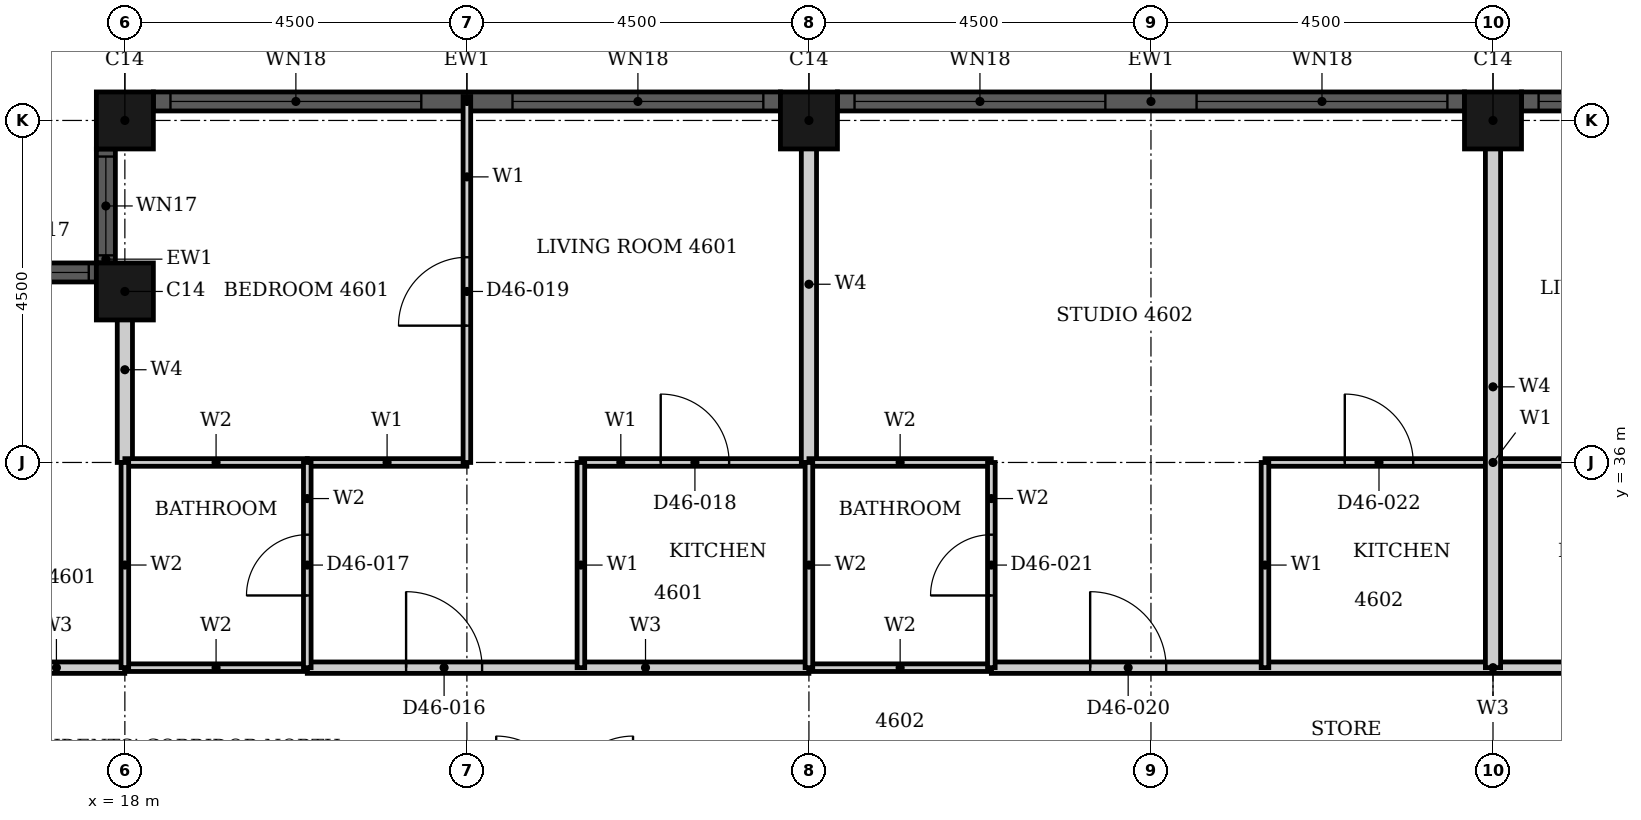
"""IFC4 building model, lengths in metres.
Left out: names, types, materials, properties, quantities, classifications, styles, units other than length and angle.
Written with IfcOpenShell. Run it as: python <this file> out.ifc"""

import sys

from ifc_helpers import new_model, si_unit, direction, frame, frame_2d, origin, origin_2d, place, context, subcontext, project, spatial, rectangle, hollow_rectangle, extrude, element, fill, save


model = new_model("IFC4")
c1 = context("Model", 3, precision=1e-05, world=origin(), true_north=direction((0.0, 1.0)))
c2 = subcontext(c1, "Body", "Model", "MODEL_VIEW")
j1 = project(units=[si_unit("LENGTHUNIT", "METRE"), si_unit("PLANEANGLEUNIT", "RADIAN")], contexts=[c1])
p1 = place(None, origin())
s1 = spatial("IfcSite", under=j1, at=p1, CompositionType="ELEMENT")
p2 = place(p1, origin())
s2 = spatial("IfcBuilding", under=s1, at=p2, CompositionType="ELEMENT")
p3 = place(p2, frame((0.0, 0.0, 183.9)))
s3 = spatial("IfcBuildingStorey", under=s2, at=p3, CompositionType="ELEMENT", Elevation=183.9)
for number, where, z_axis, x_axis in (
    (1, (36.0, 40.5, 0.0), (0.0, 0.0, 1.0), (1.0, 0.0, 0.0)),
    (2, (27.0, 40.5, 0.0), (0.0, 0.0, 1.0), (1.0, 0.0, 0.0)),
    (3, (18.0, 40.5, 0.0), (0.0, 0.0, 1.0), (1.0, 0.0, 0.0)),
    (4, (18.0, 38.25, 0.0), (0.0, 0.0, 1.0), (1.0, 0.0, 0.0)),
):
    element("IfcColumn", number, at=place(p3, frame(where, z_axis=z_axis, x_axis=x_axis)), inside=s3, PredefinedType="COLUMN", context=c2, shape_type="SweptSolid", body=[
        extrude(hollow_rectangle(XDim=0.75, YDim=0.75, WallThickness=0.024, at=origin_2d()), origin(), (0.0, 0.0, 1.0), 3.7),
    ])
p4 = place(p3, frame((44.625, 40.75, 0.0), z_axis=(0.0, 0.0, 1.0), x_axis=(-1.0, 0.0, 0.0)))
e5 = element("IfcWall", 5, at=p4, inside=s3, PredefinedType="SOLIDWALL", context=c2, shape_type="SweptSolid", body=[
    extrude(rectangle(XDim=8.25, YDim=0.25, at=frame_2d((4.125, 0.0))), origin(), (0.0, 0.0, 1.0), 3.7),
])
p5 = place(p4, frame((0.225, 0.0, 0.45)))
e6 = element("IfcOpeningElement", 6, at=p5, cuts=e5, PredefinedType="OPENING", context=c2, shape_type="SweptSolid", body=[
    extrude(rectangle(XDim=3.3, YDim=2.4, at=frame_2d((1.65, 1.2))), frame((0.0, 0.135, 0.0), z_axis=(0.0, -1.0, 0.0), x_axis=(1.0, 0.0, 0.0)), (0.0, 0.0, 1.0), 0.27),
])
p6 = place(p4, frame((4.725, 0.0, 0.45)))
e7 = element("IfcOpeningElement", 7, at=p6, cuts=e5, PredefinedType="OPENING", context=c2, shape_type="SweptSolid", body=[
    extrude(rectangle(XDim=3.3, YDim=2.4, at=frame_2d((1.65, 1.2))), frame((0.0, 0.135, 0.0), z_axis=(0.0, -1.0, 0.0), x_axis=(1.0, 0.0, 0.0)), (0.0, 0.0, 1.0), 0.27),
])
p7 = place(p3, frame((35.625, 40.75, 0.0), z_axis=(0.0, 0.0, 1.0), x_axis=(-1.0, 0.0, 0.0)))
e8 = element("IfcWall", 8, at=p7, inside=s3, PredefinedType="SOLIDWALL", context=c2, shape_type="SweptSolid", body=[
    extrude(rectangle(XDim=8.25, YDim=0.25, at=frame_2d((4.125, 0.0))), origin(), (0.0, 0.0, 1.0), 3.7),
])
p8 = place(p7, frame((0.225, 0.0, 0.45)))
e9 = element("IfcOpeningElement", 9, at=p8, cuts=e8, PredefinedType="OPENING", context=c2, shape_type="SweptSolid", body=[
    extrude(rectangle(XDim=3.3, YDim=2.4, at=frame_2d((1.65, 1.2))), frame((0.0, 0.135, 0.0), z_axis=(0.0, -1.0, 0.0), x_axis=(1.0, 0.0, 0.0)), (0.0, 0.0, 1.0), 0.27),
])
p9 = place(p7, frame((4.725, 0.0, 0.45)))
e10 = element("IfcOpeningElement", 10, at=p9, cuts=e8, PredefinedType="OPENING", context=c2, shape_type="SweptSolid", body=[
    extrude(rectangle(XDim=3.3, YDim=2.4, at=frame_2d((1.65, 1.2))), frame((0.0, 0.135, 0.0), z_axis=(0.0, -1.0, 0.0), x_axis=(1.0, 0.0, 0.0)), (0.0, 0.0, 1.0), 0.27),
])
p10 = place(p3, frame((26.625, 40.75, 0.0), z_axis=(0.0, 0.0, 1.0), x_axis=(-1.0, 0.0, 0.0)))
e11 = element("IfcWall", 11, at=p10, inside=s3, PredefinedType="SOLIDWALL", context=c2, shape_type="SweptSolid", body=[
    extrude(rectangle(XDim=8.25, YDim=0.25, at=frame_2d((4.125, 0.0))), origin(), (0.0, 0.0, 1.0), 3.7),
])
p11 = place(p10, frame((0.225, 0.0, 0.45)))
e12 = element("IfcOpeningElement", 12, at=p11, cuts=e11, PredefinedType="OPENING", context=c2, shape_type="SweptSolid", body=[
    extrude(rectangle(XDim=3.3, YDim=2.4, at=frame_2d((1.65, 1.2))), frame((0.0, 0.135, 0.0), z_axis=(0.0, -1.0, 0.0), x_axis=(1.0, 0.0, 0.0)), (0.0, 0.0, 1.0), 0.27),
])
p12 = place(p10, frame((4.725, 0.0, 0.45)))
e13 = element("IfcOpeningElement", 13, at=p12, cuts=e11, PredefinedType="OPENING", context=c2, shape_type="SweptSolid", body=[
    extrude(rectangle(XDim=3.3, YDim=2.4, at=frame_2d((1.65, 1.2))), frame((0.0, 0.135, 0.0), z_axis=(0.0, -1.0, 0.0), x_axis=(1.0, 0.0, 0.0)), (0.0, 0.0, 1.0), 0.27),
])
p13 = place(p3, frame((17.75, 40.125, 0.0), z_axis=(0.0, 0.0, 1.0), x_axis=(0.0, -1.0, 0.0)))
e14 = element("IfcWall", 14, at=p13, inside=s3, PredefinedType="SOLIDWALL", context=c2, shape_type="SweptSolid", body=[
    extrude(rectangle(XDim=1.5, YDim=0.25, at=frame_2d((0.75, 0.0))), origin(), (0.0, 0.0, 1.0), 3.7),
])
p14 = place(p13, frame((0.1, 0.0, 0.9)))
e15 = element("IfcOpeningElement", 15, at=p14, cuts=e14, PredefinedType="OPENING", context=c2, shape_type="SweptSolid", body=[
    extrude(rectangle(XDim=1.3, YDim=1.95, at=frame_2d((0.65, 0.975))), frame((0.0, 0.135, 0.0), z_axis=(0.0, -1.0, 0.0), x_axis=(1.0, 0.0, 0.0)), (0.0, 0.0, 1.0), 0.27),
])
p15 = place(p3, frame((17.625, 38.5, 0.0), z_axis=(0.0, 0.0, 1.0), x_axis=(-1.0, 0.0, 0.0)))
e16 = element("IfcWall", 16, at=p15, inside=s3, PredefinedType="SOLIDWALL", context=c2, shape_type="SweptSolid", body=[
    extrude(rectangle(XDim=1.5, YDim=0.25, at=frame_2d((0.75, 0.0))), origin(), (0.0, 0.0, 1.0), 3.7),
])
p16 = place(p15, frame((0.1, 0.0, 0.9)))
e17 = element("IfcOpeningElement", 17, at=p16, cuts=e16, PredefinedType="OPENING", context=c2, shape_type="SweptSolid", body=[
    extrude(rectangle(XDim=1.3, YDim=1.95, at=frame_2d((0.65, 0.975))), frame((0.0, 0.135, 0.0), z_axis=(0.0, -1.0, 0.0), x_axis=(1.0, 0.0, 0.0)), (0.0, 0.0, 1.0), 0.27),
])
p17 = place(p3, frame((20.4, 33.3, 0.0), z_axis=(0.0, 0.0, 1.0), x_axis=(1.0, 0.0, 0.0)))
e18 = element("IfcWall", 18, at=p17, inside=s3, PredefinedType="PARTITIONING", context=c2, shape_type="SweptSolid", body=[
    extrude(rectangle(XDim=6.6, YDim=0.15, at=frame_2d((3.3, 0.0))), origin(), (0.0, 0.0, 1.0), 3.3),
])
p18 = place(p17, frame((1.3, 0.0, 0.0)))
e19 = element("IfcOpeningElement", 19, at=p18, cuts=e18, PredefinedType="OPENING", context=c2, shape_type="SweptSolid", body=[
    extrude(rectangle(XDim=1.0, YDim=2.2, at=frame_2d((0.5, 1.1))), frame((0.0, 0.085, 0.0), z_axis=(0.0, -1.0, 0.0), x_axis=(1.0, 0.0, 0.0)), (0.0, 0.0, 1.0), 0.17),
])
p19 = place(p3, frame((29.4, 33.3, 0.0), z_axis=(0.0, 0.0, 1.0), x_axis=(1.0, 0.0, 0.0)))
e20 = element("IfcWall", 20, at=p19, inside=s3, PredefinedType="PARTITIONING", context=c2, shape_type="SweptSolid", body=[
    extrude(rectangle(XDim=13.2, YDim=0.15, at=frame_2d((6.6, 0.0))), origin(), (0.0, 0.0, 1.0), 3.3),
])
p20 = place(p19, frame((1.3, 0.0, 0.0)))
e21 = element("IfcOpeningElement", 21, at=p20, cuts=e20, PredefinedType="OPENING", context=c2, shape_type="SweptSolid", body=[
    extrude(rectangle(XDim=1.0, YDim=2.2, at=frame_2d((0.5, 1.1))), frame((0.0, 0.085, 0.0), z_axis=(0.0, -1.0, 0.0), x_axis=(1.0, 0.0, 0.0)), (0.0, 0.0, 1.0), 0.17),
])
p21 = place(p19, frame((10.9, 0.0, 0.0)))
e22 = element("IfcOpeningElement", 22, at=p21, cuts=e20, PredefinedType="OPENING", context=c2, shape_type="SweptSolid", body=[
    extrude(rectangle(XDim=1.0, YDim=2.2, at=frame_2d((0.5, 1.1))), frame((0.0, 0.085, 0.0), z_axis=(0.0, -1.0, 0.0), x_axis=(1.0, 0.0, 0.0)), (0.0, 0.0, 1.0), 0.17),
])
p22 = place(p3, frame((16.2, 33.3, 0.0), z_axis=(0.0, 0.0, 1.0), x_axis=(1.0, 0.0, 0.0)))
e23 = element("IfcWall", 23, at=p22, inside=s3, PredefinedType="PARTITIONING", context=c2, shape_type="SweptSolid", body=[
    extrude(rectangle(XDim=1.799, YDim=0.15, at=frame_2d((0.899, 0.0))), origin(), (0.0, 0.0, 1.0), 3.3),
])
p23 = place(p3, frame((20.4, 36.0, 0.0), z_axis=(0.0, 0.0, 1.0), x_axis=(1.0, 0.0, 0.0)))
e24 = element("IfcWall", 24, at=p23, inside=s3, PredefinedType="PARTITIONING", context=c2, shape_type="SweptSolid", body=[
    extrude(rectangle(XDim=2.1, YDim=0.1, at=frame_2d((1.05, 0.0))), origin(), (0.0, 0.0, 1.0), 3.3),
])
p24 = place(p3, frame((24.0, 36.0, 0.0), z_axis=(0.0, 0.0, 1.0), x_axis=(1.0, 0.0, 0.0)))
e25 = element("IfcWall", 25, at=p24, inside=s3, PredefinedType="PARTITIONING", context=c2, shape_type="SweptSolid", body=[
    extrude(rectangle(XDim=3.0, YDim=0.1, at=frame_2d((1.5, 0.0))), origin(), (0.0, 0.0, 1.0), 3.3),
])
p25 = place(p24, frame((1.05, 0.0, 0.0)))
e26 = element("IfcOpeningElement", 26, at=p25, cuts=e25, PredefinedType="OPENING", context=c2, shape_type="SweptSolid", body=[
    extrude(rectangle(XDim=0.9, YDim=2.1, at=frame_2d((0.45, 1.05))), frame((0.0, 0.06, 0.0), z_axis=(0.0, -1.0, 0.0), x_axis=(1.0, 0.0, 0.0)), (0.0, 0.0, 1.0), 0.12),
])
p26 = place(p3, frame((33.0, 36.0, 0.0), z_axis=(0.0, 0.0, 1.0), x_axis=(1.0, 0.0, 0.0)))
e27 = element("IfcWall", 27, at=p26, inside=s3, PredefinedType="PARTITIONING", context=c2, shape_type="SweptSolid", body=[
    extrude(rectangle(XDim=6.0, YDim=0.1, at=frame_2d((3.0, 0.0))), origin(), (0.0, 0.0, 1.0), 3.3),
])
p27 = place(p26, frame((1.05, 0.0, 0.0)))
e28 = element("IfcOpeningElement", 28, at=p27, cuts=e27, PredefinedType="OPENING", context=c2, shape_type="SweptSolid", body=[
    extrude(rectangle(XDim=0.9, YDim=2.1, at=frame_2d((0.45, 1.05))), frame((0.0, 0.06, 0.0), z_axis=(0.0, -1.0, 0.0), x_axis=(1.0, 0.0, 0.0)), (0.0, 0.0, 1.0), 0.12),
])
p28 = place(p26, frame((4.05, 0.0, 0.0)))
e29 = element("IfcOpeningElement", 29, at=p28, cuts=e27, PredefinedType="OPENING", context=c2, shape_type="SweptSolid", body=[
    extrude(rectangle(XDim=0.9, YDim=2.1, at=frame_2d((0.45, 1.05))), frame((0.0, 0.06, 0.0), z_axis=(0.0, -1.0, 0.0), x_axis=(1.0, 0.0, 0.0)), (0.0, 0.0, 1.0), 0.12),
])
p29 = place(p3, frame((22.5, 36.0, 0.0), z_axis=(0.0, 0.0, 1.0), x_axis=(0.0, 1.0, 0.0)))
e30 = element("IfcWall", 30, at=p29, inside=s3, PredefinedType="PARTITIONING", context=c2, shape_type="SweptSolid", body=[
    extrude(rectangle(XDim=4.815, YDim=0.1, at=frame_2d((2.407, 0.0))), origin(), (0.0, 0.0, 1.0), 3.3),
])
p30 = place(p29, frame((1.8, 0.0, 0.0)))
e31 = element("IfcOpeningElement", 31, at=p30, cuts=e30, PredefinedType="OPENING", context=c2, shape_type="SweptSolid", body=[
    extrude(rectangle(XDim=0.9, YDim=2.1, at=frame_2d((0.45, 1.05))), frame((0.0, 0.06, 0.0), z_axis=(0.0, -1.0, 0.0), x_axis=(1.0, 0.0, 0.0)), (0.0, 0.0, 1.0), 0.12),
])
for number, where, z_axis, x_axis in (
    (32, (24.0, 33.3, 0.0), (0.0, 0.0, 1.0), (0.0, 1.0, 0.0)),
    (33, (33.0, 33.3, 0.0), (0.0, 0.0, 1.0), (0.0, 1.0, 0.0)),
):
    element("IfcWall", number, at=place(p3, frame(where, z_axis=z_axis, x_axis=x_axis)), inside=s3, PredefinedType="PARTITIONING", context=c2, shape_type="SweptSolid", body=[
        extrude(rectangle(XDim=2.7, YDim=0.1, at=frame_2d((1.35, 0.0))), origin(), (0.0, 0.0, 1.0), 3.3),
    ])
p31 = place(p3, frame((18.0, 36.0, 0.0), z_axis=(0.0, 0.0, 1.0), x_axis=(0.0, 1.0, 0.0)))
e34 = element("IfcWall", 34, at=p31, inside=s3, PredefinedType="PARTITIONING", context=c2, shape_type="SweptSolid", body=[
    extrude(rectangle(XDim=2.44, YDim=0.2, at=frame_2d((1.22, 0.0))), origin(), (0.0, 0.0, 1.0), 3.3),
])
p32 = place(p3, frame((27.0, 36.0, 0.0), z_axis=(0.0, 0.0, 1.0), x_axis=(0.0, 1.0, 0.0)))
e35 = element("IfcWall", 35, at=p32, inside=s3, PredefinedType="PARTITIONING", context=c2, shape_type="SweptSolid", body=[
    extrude(rectangle(XDim=4.69, YDim=0.2, at=frame_2d((2.345, 0.0))), origin(), (0.0, 0.0, 1.0), 3.3),
])
p33 = place(p3, frame((36.0, 33.3, 0.0), z_axis=(0.0, 0.0, 1.0), x_axis=(0.0, 1.0, 0.0)))
e36 = element("IfcWall", 36, at=p33, inside=s3, PredefinedType="PARTITIONING", context=c2, shape_type="SweptSolid", body=[
    extrude(rectangle(XDim=7.39, YDim=0.2, at=frame_2d((3.695, 0.0))), origin(), (0.0, 0.0, 1.0), 3.3),
])
for number, where, z_axis, x_axis in (
    (37, (18.0, 33.3, 0.0), (0.0, 0.0, 1.0), (1.0, 0.0, 0.0)),
    (38, (27.0, 33.3, 0.0), (0.0, 0.0, 1.0), (1.0, 0.0, 0.0)),
    (39, (18.0, 36.0, 0.0), (0.0, 0.0, 1.0), (1.0, 0.0, 0.0)),
    (40, (27.0, 36.0, 0.0), (0.0, 0.0, 1.0), (1.0, 0.0, 0.0)),
):
    element("IfcWall", number, at=place(p3, frame(where, z_axis=z_axis, x_axis=x_axis)), inside=s3, PredefinedType="PARTITIONING", context=c2, shape_type="SweptSolid", body=[
        extrude(rectangle(XDim=2.4, YDim=0.1, at=frame_2d((1.2, 0.0))), origin(), (0.0, 0.0, 1.0), 3.3),
    ])
p34 = place(p3, frame((18.0, 33.301, 0.0), z_axis=(0.0, 0.0, 1.0), x_axis=(0.0, 1.0, 0.0)))
e41 = element("IfcWall", 41, at=p34, inside=s3, PredefinedType="PARTITIONING", context=c2, shape_type="SweptSolid", body=[
    extrude(rectangle(XDim=2.699, YDim=0.1, at=frame_2d((1.35, 0.0))), origin(), (0.0, 0.0, 1.0), 3.3),
])
p35 = place(p3, frame((20.4, 33.3, 0.0), z_axis=(0.0, 0.0, 1.0), x_axis=(0.0, 1.0, 0.0)))
e42 = element("IfcWall", 42, at=p35, inside=s3, PredefinedType="PARTITIONING", context=c2, shape_type="SweptSolid", body=[
    extrude(rectangle(XDim=2.7, YDim=0.1, at=frame_2d((1.35, 0.0))), origin(), (0.0, 0.0, 1.0), 3.3),
])
p36 = place(p35, frame((0.95, 0.0, 0.0)))
e43 = element("IfcOpeningElement", 43, at=p36, cuts=e42, PredefinedType="OPENING", context=c2, shape_type="SweptSolid", body=[
    extrude(rectangle(XDim=0.8, YDim=2.1, at=frame_2d((0.4, 1.05))), frame((0.0, 0.06, 0.0), z_axis=(0.0, -1.0, 0.0), x_axis=(1.0, 0.0, 0.0)), (0.0, 0.0, 1.0), 0.12),
])
p37 = place(p3, frame((27.0, 33.3, 0.0), z_axis=(0.0, 0.0, 1.0), x_axis=(0.0, 1.0, 0.0)))
e44 = element("IfcWall", 44, at=p37, inside=s3, PredefinedType="PARTITIONING", context=c2, shape_type="SweptSolid", body=[
    extrude(rectangle(XDim=2.7, YDim=0.1, at=frame_2d((1.35, 0.0))), origin(), (0.0, 0.0, 1.0), 3.3),
])
p38 = place(p3, frame((29.4, 33.3, 0.0), z_axis=(0.0, 0.0, 1.0), x_axis=(0.0, 1.0, 0.0)))
e45 = element("IfcWall", 45, at=p38, inside=s3, PredefinedType="PARTITIONING", context=c2, shape_type="SweptSolid", body=[
    extrude(rectangle(XDim=2.7, YDim=0.1, at=frame_2d((1.35, 0.0))), origin(), (0.0, 0.0, 1.0), 3.3),
])
p39 = place(p38, frame((0.95, 0.0, 0.0)))
e46 = element("IfcOpeningElement", 46, at=p39, cuts=e45, PredefinedType="OPENING", context=c2, shape_type="SweptSolid", body=[
    extrude(rectangle(XDim=0.8, YDim=2.1, at=frame_2d((0.4, 1.05))), frame((0.0, 0.06, 0.0), z_axis=(0.0, -1.0, 0.0), x_axis=(1.0, 0.0, 0.0)), (0.0, 0.0, 1.0), 0.12),
])
p40 = place(p6, origin())
e47 = element("IfcWindow", 47, at=p40, inside=s3, PartitioningType="SINGLE_PANEL", PredefinedType="WINDOW", context=c2, shape_type="SweptSolid", body=[
    extrude(rectangle(XDim=3.3, YDim=2.4, at=frame_2d((1.65, 1.2))), frame((0.0, 0.03, 0.0), z_axis=(0.0, -1.0, 0.0), x_axis=(1.0, 0.0, 0.0)), (0.0, 0.0, 1.0), 0.06),
])
fill(e7, e47)
p41 = place(p8, origin())
e48 = element("IfcWindow", 48, at=p41, inside=s3, PartitioningType="SINGLE_PANEL", PredefinedType="WINDOW", context=c2, shape_type="SweptSolid", body=[
    extrude(rectangle(XDim=3.3, YDim=2.4, at=frame_2d((1.65, 1.2))), frame((0.0, 0.03, 0.0), z_axis=(0.0, -1.0, 0.0), x_axis=(1.0, 0.0, 0.0)), (0.0, 0.0, 1.0), 0.06),
])
fill(e9, e48)
p42 = place(p9, origin())
e49 = element("IfcWindow", 49, at=p42, inside=s3, PartitioningType="SINGLE_PANEL", PredefinedType="WINDOW", context=c2, shape_type="SweptSolid", body=[
    extrude(rectangle(XDim=3.3, YDim=2.4, at=frame_2d((1.65, 1.2))), frame((0.0, 0.03, 0.0), z_axis=(0.0, -1.0, 0.0), x_axis=(1.0, 0.0, 0.0)), (0.0, 0.0, 1.0), 0.06),
])
fill(e10, e49)
p43 = place(p11, origin())
e50 = element("IfcWindow", 50, at=p43, inside=s3, PartitioningType="SINGLE_PANEL", PredefinedType="WINDOW", context=c2, shape_type="SweptSolid", body=[
    extrude(rectangle(XDim=3.3, YDim=2.4, at=frame_2d((1.65, 1.2))), frame((0.0, 0.03, 0.0), z_axis=(0.0, -1.0, 0.0), x_axis=(1.0, 0.0, 0.0)), (0.0, 0.0, 1.0), 0.06),
])
fill(e12, e50)
p44 = place(p12, origin())
e51 = element("IfcWindow", 51, at=p44, inside=s3, PartitioningType="SINGLE_PANEL", PredefinedType="WINDOW", context=c2, shape_type="SweptSolid", body=[
    extrude(rectangle(XDim=3.3, YDim=2.4, at=frame_2d((1.65, 1.2))), frame((0.0, 0.03, 0.0), z_axis=(0.0, -1.0, 0.0), x_axis=(1.0, 0.0, 0.0)), (0.0, 0.0, 1.0), 0.06),
])
fill(e13, e51)
p45 = place(p14, origin())
e52 = element("IfcWindow", 52, at=p45, inside=s3, PartitioningType="SINGLE_PANEL", PredefinedType="WINDOW", context=c2, shape_type="SweptSolid", body=[
    extrude(rectangle(XDim=1.3, YDim=1.95, at=frame_2d((0.65, 0.975))), frame((0.0, 0.03, 0.0), z_axis=(0.0, -1.0, 0.0), x_axis=(1.0, 0.0, 0.0)), (0.0, 0.0, 1.0), 0.06),
])
fill(e15, e52)
p46 = place(p16, origin())
e53 = element("IfcWindow", 53, at=p46, inside=s3, PartitioningType="SINGLE_PANEL", PredefinedType="WINDOW", context=c2, shape_type="SweptSolid", body=[
    extrude(rectangle(XDim=1.3, YDim=1.95, at=frame_2d((0.65, 0.975))), frame((0.0, 0.03, 0.0), z_axis=(0.0, -1.0, 0.0), x_axis=(1.0, 0.0, 0.0)), (0.0, 0.0, 1.0), 0.06),
])
fill(e17, e53)
p47 = place(p18, origin())
e54 = element("IfcDoor", 54, at=p47, inside=s3, OperationType="SINGLE_SWING_LEFT", PredefinedType="DOOR", context=c2, shape_type="SweptSolid", body=[
    extrude(rectangle(XDim=1.0, YDim=2.2, at=frame_2d((0.5, 1.1))), frame((0.0, 0.025, 0.0), z_axis=(0.0, -1.0, 0.0), x_axis=(1.0, 0.0, 0.0)), (0.0, 0.0, 1.0), 0.05),
])
fill(e19, e54)
p48 = place(p36, origin())
e55 = element("IfcDoor", 55, at=p48, inside=s3, OperationType="SINGLE_SWING_RIGHT", PredefinedType="DOOR", context=c2, shape_type="SweptSolid", body=[
    extrude(rectangle(XDim=0.8, YDim=2.1, at=frame_2d((0.4, 1.05))), frame((0.0, 0.025, 0.0), z_axis=(0.0, -1.0, 0.0), x_axis=(1.0, 0.0, 0.0)), (0.0, 0.0, 1.0), 0.05),
])
fill(e43, e55)
p49 = place(p25, origin())
e56 = element("IfcDoor", 56, at=p49, inside=s3, OperationType="SINGLE_SWING_RIGHT", PredefinedType="DOOR", context=c2, shape_type="SweptSolid", body=[
    extrude(rectangle(XDim=0.9, YDim=2.1, at=frame_2d((0.45, 1.05))), frame((0.0, 0.025, 0.0), z_axis=(0.0, -1.0, 0.0), x_axis=(1.0, 0.0, 0.0)), (0.0, 0.0, 1.0), 0.05),
])
fill(e26, e56)
p50 = place(p30, origin())
e57 = element("IfcDoor", 57, at=p50, inside=s3, OperationType="SINGLE_SWING_RIGHT", PredefinedType="DOOR", context=c2, shape_type="SweptSolid", body=[
    extrude(rectangle(XDim=0.9, YDim=2.1, at=frame_2d((0.45, 1.05))), frame((0.0, 0.025, 0.0), z_axis=(0.0, -1.0, 0.0), x_axis=(1.0, 0.0, 0.0)), (0.0, 0.0, 1.0), 0.05),
])
fill(e31, e57)
p51 = place(p20, origin())
e58 = element("IfcDoor", 58, at=p51, inside=s3, OperationType="SINGLE_SWING_RIGHT", PredefinedType="DOOR", context=c2, shape_type="SweptSolid", body=[
    extrude(rectangle(XDim=1.0, YDim=2.2, at=frame_2d((0.5, 1.1))), frame((0.0, 0.025, 0.0), z_axis=(0.0, -1.0, 0.0), x_axis=(1.0, 0.0, 0.0)), (0.0, 0.0, 1.0), 0.05),
])
fill(e21, e58)
p52 = place(p39, origin())
e59 = element("IfcDoor", 59, at=p52, inside=s3, OperationType="SINGLE_SWING_LEFT", PredefinedType="DOOR", context=c2, shape_type="SweptSolid", body=[
    extrude(rectangle(XDim=0.8, YDim=2.1, at=frame_2d((0.4, 1.05))), frame((0.0, 0.025, 0.0), z_axis=(0.0, -1.0, 0.0), x_axis=(1.0, 0.0, 0.0)), (0.0, 0.0, 1.0), 0.05),
])
fill(e46, e59)
p53 = place(p27, origin())
e60 = element("IfcDoor", 60, at=p53, inside=s3, OperationType="SINGLE_SWING_RIGHT", PredefinedType="DOOR", context=c2, shape_type="SweptSolid", body=[
    extrude(rectangle(XDim=0.9, YDim=2.1, at=frame_2d((0.45, 1.05))), frame((0.0, 0.025, 0.0), z_axis=(0.0, -1.0, 0.0), x_axis=(1.0, 0.0, 0.0)), (0.0, 0.0, 1.0), 0.05),
])
fill(e28, e60)
save(model, sys.argv[1])
